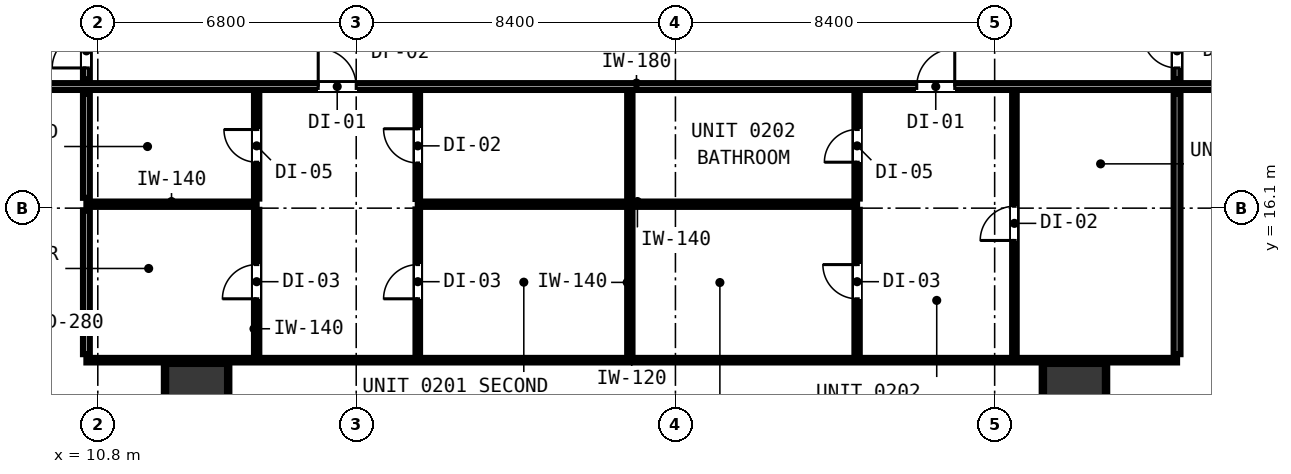
"""IFC4 building model, lengths in metres.
Left out: names, types, materials, properties, quantities, classifications, styles, units other than length and angle.
Written with IfcOpenShell. Run it as: python <this file> out.ifc"""

import sys

from ifc_helpers import new_model, si_unit, direction, frame, frame_2d, origin, origin_2d, place, context, subcontext, project, spatial, rectangle, extrude, element, fill, save


model = new_model("IFC4")
c1 = context("Model", 3, precision=1e-05, world=origin(), true_north=direction((0.0, 1.0)))
c2 = subcontext(c1, "Body", "Model", "MODEL_VIEW")
j1 = project(units=[si_unit("LENGTHUNIT", "METRE"), si_unit("PLANEANGLEUNIT", "RADIAN")], contexts=[c1])
p1 = place(None, origin())
s1 = spatial("IfcSite", under=j1, at=p1, CompositionType="ELEMENT")
p2 = place(p1, origin())
s2 = spatial("IfcBuilding", under=s1, at=p2, CompositionType="ELEMENT")
p3 = place(p2, frame((0.0, 0.0, 9.4)))
s3 = spatial("IfcBuildingStorey", under=s2, at=p3, CompositionType="ELEMENT", Elevation=9.4)
for number, where, z_axis, x_axis in (
    (1, (13.4, 11.2, 0.0), (0.0, 0.0, 1.0), (1.0, 0.0, 0.0)),
    (2, (36.5, 11.2, 0.0), (0.0, 0.0, 1.0), (1.0, 0.0, 0.0)),
):
    element("IfcColumn", number, at=place(p3, frame(where, z_axis=z_axis, x_axis=x_axis)), inside=s3, PredefinedType="COLUMN", context=c2, shape_type="SweptSolid", body=[
        extrude(rectangle(XDim=1.6, YDim=1.6, at=origin_2d()), origin(), (0.0, 0.0, 1.0), 4.2),
    ])
p4 = place(p3, frame((4.352, 19.3, 0.0), z_axis=(0.0, 0.0, 1.0), x_axis=(1.0, 0.0, 0.0)))
e3 = element("IfcWall", 3, at=p4, inside=s3, PredefinedType="PARTITIONING", context=c2, shape_type="SweptSolid", body=[
    extrude(rectangle(XDim=43.296, YDim=0.18, at=frame_2d((21.648, 0.0))), origin(), (0.0, 0.0, 1.0), 3.92),
])
p5 = place(p4, frame((12.248, 0.0, 0.0)))
e4 = element("IfcOpeningElement", 4, at=p5, cuts=e3, PredefinedType="OPENING", context=c2, shape_type="SweptSolid", body=[
    extrude(rectangle(XDim=1.0, YDim=2.15, at=frame_2d((0.5, 1.075))), frame((0.0, 0.1, 0.0), z_axis=(0.0, -1.0, 0.0), x_axis=(1.0, 0.0, 0.0)), (0.0, 0.0, 1.0), 0.2),
])
p6 = place(p4, frame((27.998, 0.0, 0.0)))
e5 = element("IfcOpeningElement", 5, at=p6, cuts=e3, PredefinedType="OPENING", context=c2, shape_type="SweptSolid", body=[
    extrude(rectangle(XDim=1.0, YDim=2.15, at=frame_2d((0.5, 1.075))), frame((0.0, 0.1, 0.0), z_axis=(0.0, -1.0, 0.0), x_axis=(1.0, 0.0, 0.0)), (0.0, 0.0, 1.0), 0.2),
])
p7 = place(p3, frame((10.5, 16.204, 0.0), z_axis=(0.0, 0.0, 1.0), x_axis=(1.0, 0.0, 0.0)))
e6 = element("IfcWall", 6, at=p7, inside=s3, PredefinedType="PARTITIONING", context=c2, shape_type="SweptSolid", body=[
    extrude(rectangle(XDim=4.48, YDim=0.14, at=frame_2d((2.24, 0.0))), origin(), (0.0, 0.0, 1.0), 3.92),
])
p8 = place(p3, frame((19.22, 16.204, 0.0), z_axis=(0.0, 0.0, 1.0), x_axis=(1.0, 0.0, 0.0)))
e7 = element("IfcWall", 7, at=p8, inside=s3, PredefinedType="PARTITIONING", context=c2, shape_type="SweptSolid", body=[
    extrude(rectangle(XDim=11.56, YDim=0.14, at=frame_2d((5.78, 0.0))), origin(), (0.0, 0.0, 1.0), 3.92),
])
p9 = place(p3, frame((10.5, 12.1, 0.0), z_axis=(0.0, 0.0, 1.0), x_axis=(1.0, 0.0, 0.0)))
e8 = element("IfcWall", 8, at=p9, inside=s3, PredefinedType="PARTITIONING", context=c2, shape_type="SweptSolid", body=[
    extrude(rectangle(XDim=28.7, YDim=0.12, at=frame_2d((14.35, 0.0))), origin(), (0.0, 0.0, 1.0), 3.92),
])
p10 = place(p3, frame((10.5, 12.258, 0.0), z_axis=(0.0, 0.0, 1.0), x_axis=(0.0, 1.0, 0.0)))
e9 = element("IfcWall", 9, at=p10, inside=s3, PredefinedType="PARTITIONING", context=c2, shape_type="SweptSolid", body=[
    extrude(rectangle(XDim=3.778, YDim=0.18, at=frame_2d((1.889, 0.0))), origin(), (0.0, 0.0, 1.0), 3.92),
])
p11 = place(p3, frame((10.5, 16.372, 0.0), z_axis=(0.0, 0.0, 1.0), x_axis=(0.0, 1.0, 0.0)))
e10 = element("IfcWall", 10, at=p11, inside=s3, PredefinedType="PARTITIONING", context=c2, shape_type="SweptSolid", body=[
    extrude(rectangle(XDim=2.74, YDim=0.18, at=frame_2d((1.37, 0.0))), origin(), (0.0, 0.0, 1.0), 3.92),
])
p12 = place(p3, frame((10.5, 19.488, 0.0), z_axis=(0.0, 0.0, 1.0), x_axis=(0.0, 1.0, 0.0)))
e11 = element("IfcWall", 11, at=p12, inside=s3, PredefinedType="PARTITIONING", context=c2, shape_type="SweptSolid", body=[
    extrude(rectangle(XDim=1.444, YDim=0.18, at=frame_2d((0.722, 0.0))), origin(), (0.0, 0.0, 1.0), 3.92),
])
p13 = place(p12, frame((0.301, 0.0, 0.0)))
e12 = element("IfcOpeningElement", 12, at=p13, cuts=e11, PredefinedType="OPENING", context=c2, shape_type="SweptSolid", body=[
    extrude(rectangle(XDim=0.9, YDim=2.1, at=frame_2d((0.45, 1.05))), frame((0.0, 0.1, 0.0), z_axis=(0.0, -1.0, 0.0), x_axis=(1.0, 0.0, 0.0)), (0.0, 0.0, 1.0), 0.2),
])
p14 = place(p3, frame((39.2, 12.258, 0.0), z_axis=(0.0, 0.0, 1.0), x_axis=(0.0, 1.0, 0.0)))
e13 = element("IfcWall", 13, at=p14, inside=s3, PredefinedType="PARTITIONING", context=c2, shape_type="SweptSolid", body=[
    extrude(rectangle(XDim=6.854, YDim=0.18, at=frame_2d((3.427, 0.0))), origin(), (0.0, 0.0, 1.0), 3.92),
])
p15 = place(p3, frame((39.2, 19.488, 0.0), z_axis=(0.0, 0.0, 1.0), x_axis=(0.0, 1.0, 0.0)))
e14 = element("IfcWall", 14, at=p15, inside=s3, PredefinedType="PARTITIONING", context=c2, shape_type="SweptSolid", body=[
    extrude(rectangle(XDim=1.444, YDim=0.18, at=frame_2d((0.722, 0.0))), origin(), (0.0, 0.0, 1.0), 3.92),
])
p16 = place(p15, frame((0.301, 0.0, 0.0)))
e15 = element("IfcOpeningElement", 15, at=p16, cuts=e14, PredefinedType="OPENING", context=c2, shape_type="SweptSolid", body=[
    extrude(rectangle(XDim=0.9, YDim=2.1, at=frame_2d((0.45, 1.05))), frame((0.0, 0.1, 0.0), z_axis=(0.0, -1.0, 0.0), x_axis=(1.0, 0.0, 0.0)), (0.0, 0.0, 1.0), 0.2),
])
p17 = place(p3, frame((14.98, 12.238, 0.0), z_axis=(0.0, 0.0, 1.0), x_axis=(0.0, 1.0, 0.0)))
e16 = element("IfcWall", 16, at=p17, inside=s3, PredefinedType="PARTITIONING", context=c2, shape_type="SweptSolid", body=[
    extrude(rectangle(XDim=3.818, YDim=0.14, at=frame_2d((1.909, 0.0))), origin(), (0.0, 0.0, 1.0), 3.92),
])
p18 = place(p17, frame((1.477, 0.0, 0.0)))
e17 = element("IfcOpeningElement", 17, at=p18, cuts=e16, PredefinedType="OPENING", context=c2, shape_type="SweptSolid", body=[
    extrude(rectangle(XDim=0.9, YDim=2.1, at=frame_2d((0.45, 1.05))), frame((0.0, 0.08, 0.0), z_axis=(0.0, -1.0, 0.0), x_axis=(1.0, 0.0, 0.0)), (0.0, 0.0, 1.0), 0.16),
])
p19 = place(p3, frame((14.98, 16.352, 0.0), z_axis=(0.0, 0.0, 1.0), x_axis=(0.0, 1.0, 0.0)))
e18 = element("IfcWall", 18, at=p19, inside=s3, PredefinedType="PARTITIONING", context=c2, shape_type="SweptSolid", body=[
    extrude(rectangle(XDim=2.78, YDim=0.14, at=frame_2d((1.39, 0.0))), origin(), (0.0, 0.0, 1.0), 3.92),
])
p20 = place(p19, frame((0.957, 0.0, 0.0)))
e19 = element("IfcOpeningElement", 19, at=p20, cuts=e18, PredefinedType="OPENING", context=c2, shape_type="SweptSolid", body=[
    extrude(rectangle(XDim=0.86, YDim=2.02, at=frame_2d((0.43, 1.01))), frame((0.0, 0.08, 0.0), z_axis=(0.0, -1.0, 0.0), x_axis=(1.0, 0.0, 0.0)), (0.0, 0.0, 1.0), 0.16),
])
p21 = place(p3, frame((24.8, 12.238, 0.0), z_axis=(0.0, 0.0, 1.0), x_axis=(0.0, 1.0, 0.0)))
e20 = element("IfcWall", 20, at=p21, inside=s3, PredefinedType="PARTITIONING", context=c2, shape_type="SweptSolid", body=[
    extrude(rectangle(XDim=3.818, YDim=0.14, at=frame_2d((1.909, 0.0))), origin(), (0.0, 0.0, 1.0), 3.92),
])
p22 = place(p3, frame((24.8, 16.352, 0.0), z_axis=(0.0, 0.0, 1.0), x_axis=(0.0, 1.0, 0.0)))
e21 = element("IfcWall", 21, at=p22, inside=s3, PredefinedType="PARTITIONING", context=c2, shape_type="SweptSolid", body=[
    extrude(rectangle(XDim=2.78, YDim=0.14, at=frame_2d((1.39, 0.0))), origin(), (0.0, 0.0, 1.0), 3.92),
])
p23 = place(p3, frame((30.78, 12.238, 0.0), z_axis=(0.0, 0.0, 1.0), x_axis=(0.0, 1.0, 0.0)))
e22 = element("IfcWall", 22, at=p23, inside=s3, PredefinedType="PARTITIONING", context=c2, shape_type="SweptSolid", body=[
    extrude(rectangle(XDim=3.818, YDim=0.14, at=frame_2d((1.909, 0.0))), origin(), (0.0, 0.0, 1.0), 3.92),
])
p24 = place(p23, frame((1.477, 0.0, 0.0)))
e23 = element("IfcOpeningElement", 23, at=p24, cuts=e22, PredefinedType="OPENING", context=c2, shape_type="SweptSolid", body=[
    extrude(rectangle(XDim=0.9, YDim=2.1, at=frame_2d((0.45, 1.05))), frame((0.0, 0.08, 0.0), z_axis=(0.0, -1.0, 0.0), x_axis=(1.0, 0.0, 0.0)), (0.0, 0.0, 1.0), 0.16),
])
p25 = place(p3, frame((30.78, 16.352, 0.0), z_axis=(0.0, 0.0, 1.0), x_axis=(0.0, 1.0, 0.0)))
e24 = element("IfcWall", 24, at=p25, inside=s3, PredefinedType="PARTITIONING", context=c2, shape_type="SweptSolid", body=[
    extrude(rectangle(XDim=2.78, YDim=0.14, at=frame_2d((1.39, 0.0))), origin(), (0.0, 0.0, 1.0), 3.92),
])
p26 = place(p25, frame((0.957, 0.0, 0.0)))
e25 = element("IfcOpeningElement", 25, at=p26, cuts=e24, PredefinedType="OPENING", context=c2, shape_type="SweptSolid", body=[
    extrude(rectangle(XDim=0.86, YDim=2.02, at=frame_2d((0.43, 1.01))), frame((0.0, 0.08, 0.0), z_axis=(0.0, -1.0, 0.0), x_axis=(1.0, 0.0, 0.0)), (0.0, 0.0, 1.0), 0.16),
])
p27 = place(p3, frame((19.22, 12.228, 0.0), z_axis=(0.0, 0.0, 1.0), x_axis=(0.0, 1.0, 0.0)))
e26 = element("IfcWall", 26, at=p27, inside=s3, PredefinedType="PARTITIONING", context=c2, shape_type="SweptSolid", body=[
    extrude(rectangle(XDim=3.838, YDim=0.12, at=frame_2d((1.919, 0.0))), origin(), (0.0, 0.0, 1.0), 3.92),
])
p28 = place(p27, frame((1.487, 0.0, 0.0)))
e27 = element("IfcOpeningElement", 27, at=p28, cuts=e26, PredefinedType="OPENING", context=c2, shape_type="SweptSolid", body=[
    extrude(rectangle(XDim=0.9, YDim=2.1, at=frame_2d((0.45, 1.05))), frame((0.0, 0.07, 0.0), z_axis=(0.0, -1.0, 0.0), x_axis=(1.0, 0.0, 0.0)), (0.0, 0.0, 1.0), 0.14),
])
p29 = place(p3, frame((19.22, 16.342, 0.0), z_axis=(0.0, 0.0, 1.0), x_axis=(0.0, 1.0, 0.0)))
e28 = element("IfcWall", 28, at=p29, inside=s3, PredefinedType="PARTITIONING", context=c2, shape_type="SweptSolid", body=[
    extrude(rectangle(XDim=2.8, YDim=0.12, at=frame_2d((1.4, 0.0))), origin(), (0.0, 0.0, 1.0), 3.92),
])
p30 = place(p29, frame((0.947, 0.0, 0.0)))
e29 = element("IfcOpeningElement", 29, at=p30, cuts=e28, PredefinedType="OPENING", context=c2, shape_type="SweptSolid", body=[
    extrude(rectangle(XDim=0.9, YDim=2.1, at=frame_2d((0.45, 1.05))), frame((0.0, 0.07, 0.0), z_axis=(0.0, -1.0, 0.0), x_axis=(1.0, 0.0, 0.0)), (0.0, 0.0, 1.0), 0.14),
])
p31 = place(p3, frame((34.92, 12.228, 0.0), z_axis=(0.0, 0.0, 1.0), x_axis=(0.0, 1.0, 0.0)))
e30 = element("IfcWall", 30, at=p31, inside=s3, PredefinedType="PARTITIONING", context=c2, shape_type="SweptSolid", body=[
    extrude(rectangle(XDim=6.914, YDim=0.12, at=frame_2d((3.457, 0.0))), origin(), (0.0, 0.0, 1.0), 3.92),
])
p32 = place(p31, frame((3.022, 0.0, 0.0)))
e31 = element("IfcOpeningElement", 31, at=p32, cuts=e30, PredefinedType="OPENING", context=c2, shape_type="SweptSolid", body=[
    extrude(rectangle(XDim=0.9, YDim=2.1, at=frame_2d((0.45, 1.05))), frame((0.0, 0.07, 0.0), z_axis=(0.0, -1.0, 0.0), x_axis=(1.0, 0.0, 0.0)), (0.0, 0.0, 1.0), 0.14),
])
p33 = place(p3, frame((12.6, 12.032, 0.0), z_axis=(0.0, 0.0, 1.0), x_axis=(1.0, 0.0, 0.0)))
e32 = element("IfcWall", 32, at=p33, inside=s3, PredefinedType="PARTITIONING", context=c2, shape_type="SweptSolid", body=[
    extrude(rectangle(XDim=1.6, YDim=0.06, at=frame_2d((0.8, 0.0))), origin(), (0.0, 0.0, 1.0), 1.45),
])
for number, where, z_axis, x_axis in (
    (33, (12.568, 10.4, 0.0), (0.0, 0.0, 1.0), (0.0, 1.0, 0.0)),
    (34, (14.232, 10.4, 0.0), (0.0, 0.0, 1.0), (0.0, 1.0, 0.0)),
    (35, (35.7, 12.032, 0.0), (0.0, 0.0, 1.0), (1.0, 0.0, 0.0)),
    (36, (35.668, 10.4, 0.0), (0.0, 0.0, 1.0), (0.0, 1.0, 0.0)),
    (37, (37.332, 10.4, 0.0), (0.0, 0.0, 1.0), (0.0, 1.0, 0.0)),
):
    element("IfcWall", number, at=place(p3, frame(where, z_axis=z_axis, x_axis=x_axis)), inside=s3, PredefinedType="PARTITIONING", context=c2, shape_type="SweptSolid", body=[
        extrude(rectangle(XDim=1.6, YDim=0.06, at=frame_2d((0.8, 0.0))), origin(), (0.0, 0.0, 1.0), 1.45),
    ])
p34 = place(p13, origin())
e38 = element("IfcDoor", 38, at=p34, inside=s3, OperationType="SINGLE_SWING_LEFT", PredefinedType="DOOR", context=c2, shape_type="SweptSolid", body=[
    extrude(rectangle(XDim=0.9, YDim=2.1, at=frame_2d((0.45, 1.05))), frame((0.0, 0.025, 0.0), z_axis=(0.0, -1.0, 0.0), x_axis=(1.0, 0.0, 0.0)), (0.0, 0.0, 1.0), 0.05),
])
fill(e12, e38)
p35 = place(p16, origin())
e39 = element("IfcDoor", 39, at=p35, inside=s3, OperationType="SINGLE_SWING_RIGHT", PredefinedType="DOOR", context=c2, shape_type="SweptSolid", body=[
    extrude(rectangle(XDim=0.9, YDim=2.1, at=frame_2d((0.45, 1.05))), frame((0.0, 0.025, 0.0), z_axis=(0.0, -1.0, 0.0), x_axis=(1.0, 0.0, 0.0)), (0.0, 0.0, 1.0), 0.05),
])
fill(e15, e39)
p36 = place(p5, origin())
e40 = element("IfcDoor", 40, at=p36, inside=s3, OperationType="SINGLE_SWING_LEFT", PredefinedType="DOOR", context=c2, shape_type="SweptSolid", body=[
    extrude(rectangle(XDim=1.0, YDim=2.15, at=frame_2d((0.5, 1.075))), frame((0.0, 0.025, 0.0), z_axis=(0.0, -1.0, 0.0), x_axis=(1.0, 0.0, 0.0)), (0.0, 0.0, 1.0), 0.05),
])
fill(e4, e40)
p37 = place(p20, origin())
e41 = element("IfcDoor", 41, at=p37, inside=s3, OperationType="SINGLE_SWING_RIGHT", PredefinedType="DOOR", context=c2, shape_type="SweptSolid", body=[
    extrude(rectangle(XDim=0.86, YDim=2.02, at=frame_2d((0.43, 1.01))), frame((0.0, 0.025, 0.0), z_axis=(0.0, -1.0, 0.0), x_axis=(1.0, 0.0, 0.0)), (0.0, 0.0, 1.0), 0.05),
])
fill(e19, e41)
p38 = place(p18, origin())
e42 = element("IfcDoor", 42, at=p38, inside=s3, OperationType="SINGLE_SWING_LEFT", PredefinedType="DOOR", context=c2, shape_type="SweptSolid", body=[
    extrude(rectangle(XDim=0.9, YDim=2.1, at=frame_2d((0.45, 1.05))), frame((0.0, 0.025, 0.0), z_axis=(0.0, -1.0, 0.0), x_axis=(1.0, 0.0, 0.0)), (0.0, 0.0, 1.0), 0.05),
])
fill(e17, e42)
p39 = place(p30, origin())
e43 = element("IfcDoor", 43, at=p39, inside=s3, OperationType="SINGLE_SWING_RIGHT", PredefinedType="DOOR", context=c2, shape_type="SweptSolid", body=[
    extrude(rectangle(XDim=0.9, YDim=2.1, at=frame_2d((0.45, 1.05))), frame((0.0, 0.025, 0.0), z_axis=(0.0, -1.0, 0.0), x_axis=(1.0, 0.0, 0.0)), (0.0, 0.0, 1.0), 0.05),
])
fill(e29, e43)
p40 = place(p28, origin())
e44 = element("IfcDoor", 44, at=p40, inside=s3, OperationType="SINGLE_SWING_LEFT", PredefinedType="DOOR", context=c2, shape_type="SweptSolid", body=[
    extrude(rectangle(XDim=0.9, YDim=2.1, at=frame_2d((0.45, 1.05))), frame((0.0, 0.025, 0.0), z_axis=(0.0, -1.0, 0.0), x_axis=(1.0, 0.0, 0.0)), (0.0, 0.0, 1.0), 0.05),
])
fill(e27, e44)
p41 = place(p6, origin())
e45 = element("IfcDoor", 45, at=p41, inside=s3, OperationType="SINGLE_SWING_RIGHT", PredefinedType="DOOR", context=c2, shape_type="SweptSolid", body=[
    extrude(rectangle(XDim=1.0, YDim=2.15, at=frame_2d((0.5, 1.075))), frame((0.0, 0.025, 0.0), z_axis=(0.0, -1.0, 0.0), x_axis=(1.0, 0.0, 0.0)), (0.0, 0.0, 1.0), 0.05),
])
fill(e5, e45)
p42 = place(p26, origin())
e46 = element("IfcDoor", 46, at=p42, inside=s3, OperationType="SINGLE_SWING_LEFT", PredefinedType="DOOR", context=c2, shape_type="SweptSolid", body=[
    extrude(rectangle(XDim=0.86, YDim=2.02, at=frame_2d((0.43, 1.01))), frame((0.0, 0.025, 0.0), z_axis=(0.0, -1.0, 0.0), x_axis=(1.0, 0.0, 0.0)), (0.0, 0.0, 1.0), 0.05),
])
fill(e25, e46)
p43 = place(p24, origin())
e47 = element("IfcDoor", 47, at=p43, inside=s3, OperationType="SINGLE_SWING_RIGHT", PredefinedType="DOOR", context=c2, shape_type="SweptSolid", body=[
    extrude(rectangle(XDim=0.9, YDim=2.1, at=frame_2d((0.45, 1.05))), frame((0.0, 0.025, 0.0), z_axis=(0.0, -1.0, 0.0), x_axis=(1.0, 0.0, 0.0)), (0.0, 0.0, 1.0), 0.05),
])
fill(e23, e47)
p44 = place(p32, origin())
e48 = element("IfcDoor", 48, at=p44, inside=s3, OperationType="SINGLE_SWING_LEFT", PredefinedType="DOOR", context=c2, shape_type="SweptSolid", body=[
    extrude(rectangle(XDim=0.9, YDim=2.1, at=frame_2d((0.45, 1.05))), frame((0.0, 0.025, 0.0), z_axis=(0.0, -1.0, 0.0), x_axis=(1.0, 0.0, 0.0)), (0.0, 0.0, 1.0), 0.05),
])
fill(e31, e48)
save(model, sys.argv[1])
